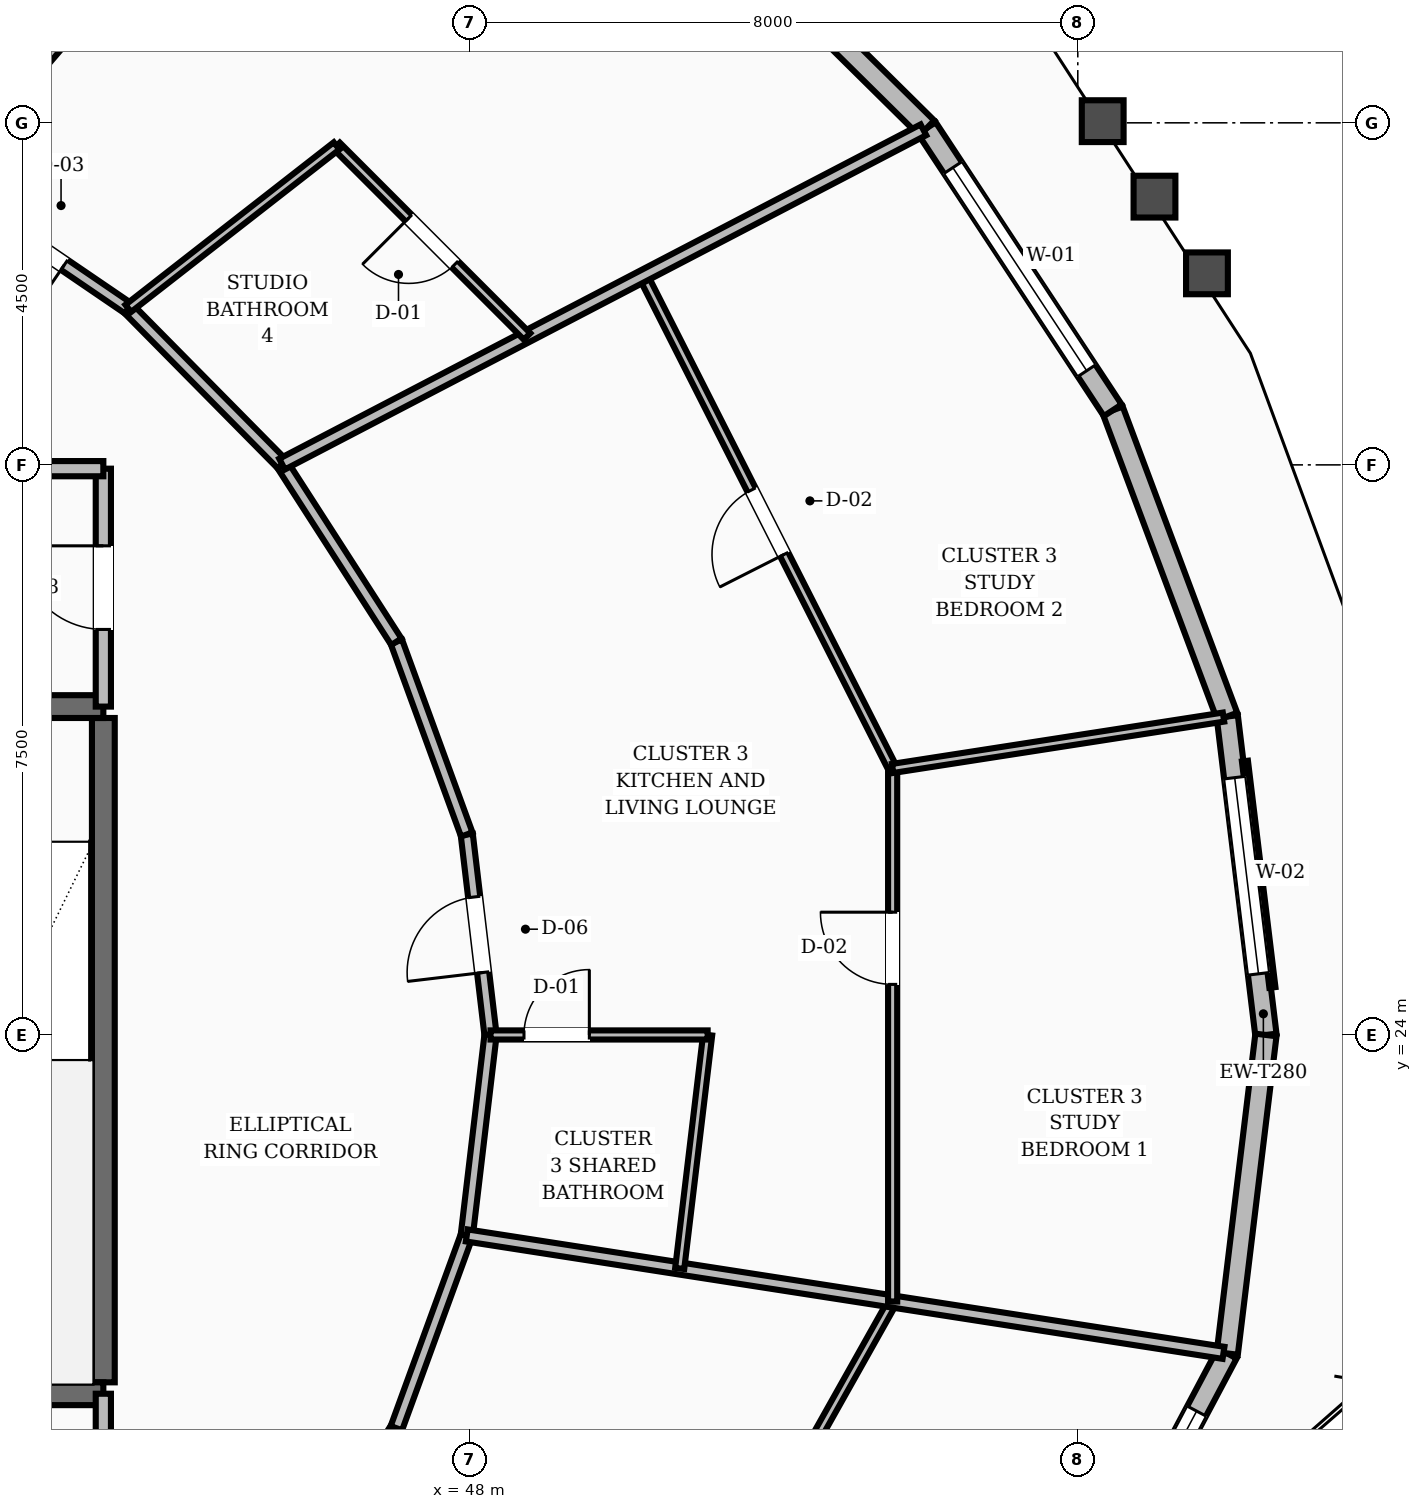
"""IFC4 building model, lengths in metres.
Left out: names, types, materials, properties, quantities, classifications, styles, units other than length and angle.
Written with IfcOpenShell. Run it as: python <this file> out.ifc"""

import sys

from ifc_helpers import new_model, si_unit, direction, frame, frame_2d, origin, place, context, subcontext, project, spatial, rectangle, extrude, element, fill, save


model = new_model("IFC4")
c1 = context("Model", 3, precision=1e-05, world=origin(), true_north=direction((0.0, 1.0)))
c2 = subcontext(c1, "Body", "Model", "MODEL_VIEW")
j1 = project(units=[si_unit("LENGTHUNIT", "METRE"), si_unit("PLANEANGLEUNIT", "RADIAN")], contexts=[c1])
p1 = place(None, origin())
s1 = spatial("IfcSite", under=j1, at=p1, CompositionType="ELEMENT")
p2 = place(p1, origin())
s2 = spatial("IfcBuilding", under=s1, at=p2, CompositionType="ELEMENT")
p3 = place(p2, frame((0.0, 0.0, 52.0)))
s3 = spatial("IfcBuildingStorey", under=s2, at=p3, CompositionType="ELEMENT", Elevation=52.0)
p4 = place(p3, frame((43.18, 19.43, 0.0), z_axis=(0.0, 0.0, 1.0), x_axis=(0.0, 1.0, 0.0)))
e1 = element("IfcWall", 1, at=p4, inside=s3, PredefinedType="SHEAR", context=c2, shape_type="SweptSolid", body=[
    extrude(rectangle(XDim=8.74, YDim=0.3, at=frame_2d((4.37, 0.0))), origin(), (0.0, 0.0, 1.0), 3.6),
])
p5 = place(p3, frame((39.58, 19.28, 0.0), z_axis=(0.0, 0.0, 1.0), x_axis=(1.0, 0.0, 0.0)))
e2 = element("IfcWall", 2, at=p5, inside=s3, PredefinedType="SHEAR", context=c2, shape_type="SweptSolid", body=[
    extrude(rectangle(XDim=3.6, YDim=0.3, at=frame_2d((1.8, 0.0))), origin(), (0.0, 0.0, 1.0), 3.6),
])
p6 = place(p3, frame((39.58, 28.32, 0.0), z_axis=(0.0, 0.0, 1.0), x_axis=(1.0, 0.0, 0.0)))
e3 = element("IfcWall", 3, at=p6, inside=s3, PredefinedType="SHEAR", context=c2, shape_type="SweptSolid", body=[
    extrude(rectangle(XDim=3.6, YDim=0.3, at=frame_2d((1.8, 0.0))), origin(), (0.0, 0.0, 1.0), 3.6),
])
p7 = place(p6, frame((1.3, 0.0, 0.0)))
e4 = element("IfcOpeningElement", 4, at=p7, cuts=e3, PredefinedType="OPENING", context=c2, shape_type="SweptSolid", body=[
    extrude(rectangle(XDim=1.1, YDim=2.1, at=frame_2d((0.55, 1.05))), frame((0.0, 0.16, 0.0), z_axis=(0.0, -1.0, 0.0), x_axis=(1.0, 0.0, 0.0)), (0.0, 0.0, 1.0), 0.32),
])
p8 = place(p3, frame((58.475, 24.0, 0.0), z_axis=(0.0, 0.0, 1.0), x_axis=(-0.120495484084, 0.992713875352, 0.0)))
e5 = element("IfcWall", 5, at=p8, inside=s3, PredefinedType="STANDARD", context=c2, shape_type="SweptSolid", body=[
    extrude(rectangle(XDim=4.22, YDim=0.28, at=frame_2d((2.11, 0.0))), origin(), (0.0, 0.0, 1.0), 2.65),
])
p9 = place(p8, frame((0.81, 0.0, 0.8)))
e6 = element("IfcOpeningElement", 6, at=p9, cuts=e5, PredefinedType="OPENING", context=c2, shape_type="SweptSolid", body=[
    extrude(rectangle(XDim=2.6, YDim=1.65, at=frame_2d((1.3, 0.825))), frame((0.0, 0.15, 0.0), z_axis=(0.0, -1.0, 0.0), x_axis=(1.0, 0.0, 0.0)), (0.0, 0.0, 1.0), 0.3),
])
p10 = place(p3, frame((57.967, 28.19, 0.0), z_axis=(0.0, 0.0, 1.0), x_axis=(-0.350283521278, 0.936643718135, 0.0)))
e7 = element("IfcWall", 7, at=p10, inside=s3, PredefinedType="STANDARD", context=c2, shape_type="SweptSolid", body=[
    extrude(rectangle(XDim=4.301, YDim=0.28, at=frame_2d((2.15, 0.0))), origin(), (0.0, 0.0, 1.0), 2.65),
])
p11 = place(p3, frame((56.46, 32.218, 0.0), z_axis=(0.0, 0.0, 1.0), x_axis=(-0.550282912527, 0.834978272879, 0.0)))
e8 = element("IfcWall", 8, at=p11, inside=s3, PredefinedType="STANDARD", context=c2, shape_type="SweptSolid", body=[
    extrude(rectangle(XDim=4.446, YDim=0.28, at=frame_2d((2.223, 0.0))), origin(), (0.0, 0.0, 1.0), 2.65),
])
p12 = place(p11, frame((0.623, 0.0, 0.8)))
e9 = element("IfcOpeningElement", 9, at=p12, cuts=e8, PredefinedType="OPENING", context=c2, shape_type="SweptSolid", body=[
    extrude(rectangle(XDim=3.2, YDim=1.65, at=frame_2d((1.6, 0.825))), frame((0.0, 0.15, 0.0), z_axis=(0.0, -1.0, 0.0), x_axis=(1.0, 0.0, 0.0)), (0.0, 0.0, 1.0), 0.3),
])
p13 = place(p3, frame((54.013, 35.931, 0.0), z_axis=(0.0, 0.0, 1.0), x_axis=(-0.711208285642, 0.702981347146, 0.0)))
e10 = element("IfcWall", 10, at=p13, inside=s3, PredefinedType="STANDARD", context=c2, shape_type="SweptSolid", body=[
    extrude(rectangle(XDim=4.629, YDim=0.28, at=frame_2d((2.315, 0.0))), origin(), (0.0, 0.0, 1.0), 2.65),
])
p14 = place(p3, frame((55.899, 15.915, 0.0), z_axis=(0.0, 0.0, 1.0), x_axis=(0.46873960988, 0.883336390131, 0.0)))
e11 = element("IfcWall", 11, at=p14, inside=s3, PredefinedType="STANDARD", context=c2, shape_type="SweptSolid", body=[
    extrude(rectangle(XDim=4.41, YDim=0.28, at=frame_2d((2.205, 0.0))), origin(), (0.0, 0.0, 1.0), 2.65),
])
p15 = place(p14, frame((0.951, 0.0, 0.8)))
e12 = element("IfcOpeningElement", 12, at=p15, cuts=e11, PredefinedType="OPENING", context=c2, shape_type="SweptSolid", body=[
    extrude(rectangle(XDim=2.6, YDim=1.65, at=frame_2d((1.3, 0.825))), frame((0.0, 0.15, 0.0), z_axis=(0.0, -1.0, 0.0), x_axis=(1.0, 0.0, 0.0)), (0.0, 0.0, 1.0), 0.3),
])
p16 = place(p3, frame((57.967, 19.81, 0.0), z_axis=(0.0, 0.0, 1.0), x_axis=(0.120495484084, 0.992713875352, 0.0)))
e13 = element("IfcWall", 13, at=p16, inside=s3, PredefinedType="STANDARD", context=c2, shape_type="SweptSolid", body=[
    extrude(rectangle(XDim=4.22, YDim=0.28, at=frame_2d((2.11, 0.0))), origin(), (0.0, 0.0, 1.0), 2.65),
])
p17 = place(p3, frame((43.18, 28.32, 0.0), z_axis=(0.0, 0.0, 1.0), x_axis=(0.0, 1.0, 0.0)))
e14 = element("IfcWall", 14, at=p17, inside=s3, PredefinedType="SOLIDWALL", context=c2, shape_type="SweptSolid", body=[
    extrude(rectangle(XDim=3.13, YDim=0.2, at=frame_2d((1.565, 0.0))), origin(), (0.0, 0.0, 1.0), 2.61),
])
p18 = place(p17, frame((1.015, 0.0, 0.0)))
e15 = element("IfcOpeningElement", 15, at=p18, cuts=e14, PredefinedType="OPENING", context=c2, shape_type="SweptSolid", body=[
    extrude(rectangle(XDim=1.1, YDim=2.1, at=frame_2d((0.55, 1.05))), frame((0.0, 0.11, 0.0), z_axis=(0.0, -1.0, 0.0), x_axis=(1.0, 0.0, 0.0)), (0.0, 0.0, 1.0), 0.22),
])
p19 = place(p3, frame((39.2, 31.45, 0.0), z_axis=(0.0, 0.0, 1.0), x_axis=(1.0, 0.0, 0.0)))
e16 = element("IfcWall", 16, at=p19, inside=s3, PredefinedType="SOLIDWALL", context=c2, shape_type="SweptSolid", body=[
    extrude(rectangle(XDim=3.98, YDim=0.2, at=frame_2d((1.99, 0.0))), origin(), (0.0, 0.0, 1.0), 2.61),
])
p20 = place(p3, frame((43.18, 16.55, 0.0), z_axis=(0.0, 0.0, 1.0), x_axis=(0.0, 1.0, 0.0)))
e17 = element("IfcWall", 17, at=p20, inside=s3, PredefinedType="SOLIDWALL", context=c2, shape_type="SweptSolid", body=[
    extrude(rectangle(XDim=2.73, YDim=0.2, at=frame_2d((1.365, 0.0))), origin(), (0.0, 0.0, 1.0), 2.61),
])
p21 = place(p20, frame((0.89, 0.0, 0.0)))
e18 = element("IfcOpeningElement", 18, at=p21, cuts=e17, PredefinedType="OPENING", context=c2, shape_type="SweptSolid", body=[
    extrude(rectangle(XDim=0.95, YDim=2.1, at=frame_2d((0.475, 1.05))), frame((0.0, 0.11, 0.0), z_axis=(0.0, -1.0, 0.0), x_axis=(1.0, 0.0, 0.0)), (0.0, 0.0, 1.0), 0.22),
])
p22 = place(p3, frame((48.274, 24.0, 0.0), z_axis=(0.0, 0.0, 1.0), x_axis=(-0.117763961213, 0.99304161516, 0.0)))
e19 = element("IfcWall", 19, at=p22, inside=s3, PredefinedType="SOLIDWALL", context=c2, shape_type="SweptSolid", body=[
    extrude(rectangle(XDim=2.656, YDim=0.16, at=frame_2d((1.328, 0.0))), origin(), (0.0, 0.0, 1.0), 2.61),
])
p23 = place(p22, frame((0.828, 0.0, 0.0)))
e20 = element("IfcOpeningElement", 20, at=p23, cuts=e19, PredefinedType="OPENING", context=c2, shape_type="SweptSolid", body=[
    extrude(rectangle(XDim=1.0, YDim=2.1, at=frame_2d((0.5, 1.05))), frame((0.0, 0.09, 0.0), z_axis=(0.0, -1.0, 0.0), x_axis=(1.0, 0.0, 0.0)), (0.0, 0.0, 1.0), 0.18),
])
p24 = place(p3, frame((47.961, 26.637, 0.0), z_axis=(0.0, 0.0, 1.0), x_axis=(-0.343013437329, 0.939330496583, 0.0)))
e21 = element("IfcWall", 21, at=p24, inside=s3, PredefinedType="SOLIDWALL", context=c2, shape_type="SweptSolid", body=[
    extrude(rectangle(XDim=2.7, YDim=0.16, at=frame_2d((1.35, 0.0))), origin(), (0.0, 0.0, 1.0), 2.61),
])
p25 = place(p3, frame((47.035, 29.173, 0.0), z_axis=(0.0, 0.0, 1.0), x_axis=(-0.541126045017, 0.840941498206, 0.0)))
e22 = element("IfcWall", 22, at=p25, inside=s3, PredefinedType="SOLIDWALL", context=c2, shape_type="SweptSolid", body=[
    extrude(rectangle(XDim=2.779, YDim=0.16, at=frame_2d((1.39, 0.0))), origin(), (0.0, 0.0, 1.0), 2.61),
])
p26 = place(p3, frame((45.531, 31.51, 0.0), z_axis=(0.0, 0.0, 1.0), x_axis=(-0.702811997, 0.711375636969, 0.0)))
e23 = element("IfcWall", 23, at=p26, inside=s3, PredefinedType="SOLIDWALL", context=c2, shape_type="SweptSolid", body=[
    extrude(rectangle(XDim=2.879, YDim=0.16, at=frame_2d((1.44, 0.0))), origin(), (0.0, 0.0, 1.0), 2.61),
])
p27 = place(p3, frame((43.508, 33.559, 0.0), z_axis=(0.0, 0.0, 1.0), x_axis=(-0.826293096206, 0.56324037423, 0.0)))
e24 = element("IfcWall", 24, at=p27, inside=s3, PredefinedType="SOLIDWALL", context=c2, shape_type="SweptSolid", body=[
    extrude(rectangle(XDim=2.985, YDim=0.16, at=frame_2d((1.492, 0.0))), origin(), (0.0, 0.0, 1.0), 2.61),
])
p28 = place(p27, frame((1.017, 0.0, 0.0)))
e25 = element("IfcOpeningElement", 25, at=p28, cuts=e24, PredefinedType="OPENING", context=c2, shape_type="SweptSolid", body=[
    extrude(rectangle(XDim=0.95, YDim=2.1, at=frame_2d((0.475, 1.05))), frame((0.0, 0.09, 0.0), z_axis=(0.0, -1.0, 0.0), x_axis=(1.0, 0.0, 0.0)), (0.0, 0.0, 1.0), 0.18),
])
p29 = place(p3, frame((45.531, 16.49, 0.0), z_axis=(0.0, 0.0, 1.0), x_axis=(0.541126045017, 0.840941498206, 0.0)))
e26 = element("IfcWall", 26, at=p29, inside=s3, PredefinedType="SOLIDWALL", context=c2, shape_type="SweptSolid", body=[
    extrude(rectangle(XDim=2.779, YDim=0.16, at=frame_2d((1.39, 0.0))), origin(), (0.0, 0.0, 1.0), 2.61),
])
p30 = place(p3, frame((47.035, 18.827, 0.0), z_axis=(0.0, 0.0, 1.0), x_axis=(0.343013437329, 0.939330496583, 0.0)))
e27 = element("IfcWall", 27, at=p30, inside=s3, PredefinedType="SOLIDWALL", context=c2, shape_type="SweptSolid", body=[
    extrude(rectangle(XDim=2.7, YDim=0.16, at=frame_2d((1.35, 0.0))), origin(), (0.0, 0.0, 1.0), 2.61),
])
p31 = place(p3, frame((47.961, 21.363, 0.0), z_axis=(0.0, 0.0, 1.0), x_axis=(0.117763961213, 0.99304161516, 0.0)))
e28 = element("IfcWall", 28, at=p31, inside=s3, PredefinedType="SOLIDWALL", context=c2, shape_type="SweptSolid", body=[
    extrude(rectangle(XDim=2.656, YDim=0.16, at=frame_2d((1.328, 0.0))), origin(), (0.0, 0.0, 1.0), 2.61),
])
p32 = place(p3, frame((50.021, 14.188, 0.0), z_axis=(0.0, 0.0, 1.0), x_axis=(0.489964721586, 0.87174226214, 0.0)))
e29 = element("IfcWall", 29, at=p32, inside=s3, PredefinedType="PARTITIONING", context=c2, shape_type="SweptSolid", body=[
    extrude(rectangle(XDim=7.233, YDim=0.12, at=frame_2d((3.616, 0.0))), origin(), (0.0, 0.0, 1.0), 2.61),
])
p33 = place(p32, frame((3.141, 0.0, 0.0)))
e30 = element("IfcOpeningElement", 30, at=p33, cuts=e29, PredefinedType="OPENING", context=c2, shape_type="SweptSolid", body=[
    extrude(rectangle(XDim=0.95, YDim=2.1, at=frame_2d((0.475, 1.05))), frame((0.0, 0.07, 0.0), z_axis=(0.0, -1.0, 0.0), x_axis=(1.0, 0.0, 0.0)), (0.0, 0.0, 1.0), 0.14),
])
p34 = place(p3, frame((47.961, 21.363, 0.0), z_axis=(0.0, 0.0, 1.0), x_axis=(0.988176752001, -0.153318970792, 0.0)))
e31 = element("IfcWall", 31, at=p34, inside=s3, PredefinedType="SOLIDWALL", context=c2, shape_type="SweptSolid", body=[
    extrude(rectangle(XDim=10.075, YDim=0.16, at=frame_2d((5.038, 0.0))), origin(), (0.0, 0.0, 1.0), 2.61),
])
p35 = place(p3, frame((50.763, 20.928, 0.0), z_axis=(0.0, 0.0, 1.0), x_axis=(0.118837170514, 0.992913756025, 0.0)))
e32 = element("IfcWall", 32, at=p35, inside=s3, PredefinedType="PARTITIONING", context=c2, shape_type="SweptSolid", body=[
    extrude(rectangle(XDim=3.094, YDim=0.12, at=frame_2d((1.547, 0.0))), origin(), (0.0, 0.0, 1.0), 2.61),
])
p36 = place(p3, frame((48.274, 24.0, 0.0), z_axis=(0.0, 0.0, 1.0), x_axis=(1.0, 0.0, 0.0)))
e33 = element("IfcWall", 33, at=p36, inside=s3, PredefinedType="PARTITIONING", context=c2, shape_type="SweptSolid", body=[
    extrude(rectangle(XDim=2.856, YDim=0.12, at=frame_2d((1.428, 0.0))), origin(), (0.0, 0.0, 1.0), 2.61),
])
p37 = place(p36, frame((0.44, 0.0, 0.0)))
e34 = element("IfcOpeningElement", 34, at=p37, cuts=e33, PredefinedType="OPENING", context=c2, shape_type="SweptSolid", body=[
    extrude(rectangle(XDim=0.86, YDim=2.1, at=frame_2d((0.43, 1.05))), frame((0.0, 0.07, 0.0), z_axis=(0.0, -1.0, 0.0), x_axis=(1.0, 0.0, 0.0)), (0.0, 0.0, 1.0), 0.14),
])
p38 = place(p3, frame((53.564, 20.493, 0.0), z_axis=(0.0, 0.0, 1.0), x_axis=(0.0, 1.0, 0.0)))
e35 = element("IfcWall", 35, at=p38, inside=s3, PredefinedType="PARTITIONING", context=c2, shape_type="SweptSolid", body=[
    extrude(rectangle(XDim=7.013, YDim=0.12, at=frame_2d((3.507, 0.0))), origin(), (0.0, 0.0, 1.0), 2.61),
])
p39 = place(p38, frame((4.172, 0.0, 0.0)))
e36 = element("IfcOpeningElement", 36, at=p39, cuts=e35, PredefinedType="OPENING", context=c2, shape_type="SweptSolid", body=[
    extrude(rectangle(XDim=0.95, YDim=2.1, at=frame_2d((0.475, 1.05))), frame((0.0, 0.07, 0.0), z_axis=(0.0, -1.0, 0.0), x_axis=(1.0, 0.0, 0.0)), (0.0, 0.0, 1.0), 0.14),
])
p40 = place(p3, frame((53.564, 27.507, 0.0), z_axis=(0.0, 0.0, 1.0), x_axis=(-0.451980127483, 0.892028006489, 0.0)))
e37 = element("IfcWall", 37, at=p40, inside=s3, PredefinedType="PARTITIONING", context=c2, shape_type="SweptSolid", body=[
    extrude(rectangle(XDim=7.263, YDim=0.12, at=frame_2d((3.632, 0.0))), origin(), (0.0, 0.0, 1.0), 2.61),
])
p41 = place(p40, frame((3.157, 0.0, 0.0)))
e38 = element("IfcOpeningElement", 38, at=p41, cuts=e37, PredefinedType="OPENING", context=c2, shape_type="SweptSolid", body=[
    extrude(rectangle(XDim=0.95, YDim=2.1, at=frame_2d((0.475, 1.05))), frame((0.0, 0.07, 0.0), z_axis=(0.0, -1.0, 0.0), x_axis=(1.0, 0.0, 0.0)), (0.0, 0.0, 1.0), 0.14),
])
p42 = place(p3, frame((53.564, 27.507, 0.0), z_axis=(0.0, 0.0, 1.0), x_axis=(0.988178681205, 0.153306536105, 0.0)))
e39 = element("IfcWall", 39, at=p42, inside=s3, PredefinedType="PARTITIONING", context=c2, shape_type="SweptSolid", body=[
    extrude(rectangle(XDim=4.405, YDim=0.12, at=frame_2d((2.202, 0.0))), origin(), (0.0, 0.0, 1.0), 2.61),
])
p43 = place(p3, frame((45.531, 31.51, 0.0), z_axis=(0.0, 0.0, 1.0), x_axis=(0.886782865133, 0.462186272088, 0.0)))
e40 = element("IfcWall", 40, at=p43, inside=s3, PredefinedType="SOLIDWALL", context=c2, shape_type="SweptSolid", body=[
    extrude(rectangle(XDim=9.515, YDim=0.16, at=frame_2d((4.757, 0.0))), origin(), (0.0, 0.0, 1.0), 2.61),
])
p44 = place(p3, frame((48.754, 33.19, 0.0), z_axis=(0.0, 0.0, 1.0), x_axis=(-0.707003450842, 0.707210096434, 0.0)))
e41 = element("IfcWall", 41, at=p44, inside=s3, PredefinedType="PARTITIONING", context=c2, shape_type="SweptSolid", body=[
    extrude(rectangle(XDim=3.544, YDim=0.12, at=frame_2d((1.772, 0.0))), origin(), (0.0, 0.0, 1.0), 2.61),
])
p45 = place(p44, frame((1.342, 0.0, 0.0)))
e42 = element("IfcOpeningElement", 42, at=p45, cuts=e41, PredefinedType="OPENING", context=c2, shape_type="SweptSolid", body=[
    extrude(rectangle(XDim=0.86, YDim=2.1, at=frame_2d((0.43, 1.05))), frame((0.0, 0.07, 0.0), z_axis=(0.0, -1.0, 0.0), x_axis=(1.0, 0.0, 0.0)), (0.0, 0.0, 1.0), 0.14),
])
p46 = place(p3, frame((43.508, 33.559, 0.0), z_axis=(0.0, 0.0, 1.0), x_axis=(0.788470290208, 0.615072842401, 0.0)))
e43 = element("IfcWall", 43, at=p46, inside=s3, PredefinedType="PARTITIONING", context=c2, shape_type="SweptSolid", body=[
    extrude(rectangle(XDim=3.476, YDim=0.12, at=frame_2d((1.738, 0.0))), origin(), (0.0, 0.0, 1.0), 2.61),
])
p47 = place(p3, frame((41.041, 35.24, 0.0), z_axis=(0.0, 0.0, 1.0), x_axis=(0.650552260828, 0.75946149075, 0.0)))
e44 = element("IfcWall", 44, at=p47, inside=s3, PredefinedType="SOLIDWALL", context=c2, shape_type="SweptSolid", body=[
    extrude(rectangle(XDim=8.662, YDim=0.16, at=frame_2d((4.331, 0.0))), origin(), (0.0, 0.0, 1.0), 2.61),
])
p48 = place(p9, origin())
e45 = element("IfcWindow", 45, at=p48, inside=s3, PartitioningType="SINGLE_PANEL", PredefinedType="WINDOW", context=c2, shape_type="SweptSolid", body=[
    extrude(rectangle(XDim=2.6, YDim=1.65, at=frame_2d((1.3, 0.825))), frame((0.0, 0.03, 0.0), z_axis=(0.0, -1.0, 0.0), x_axis=(1.0, 0.0, 0.0)), (0.0, 0.0, 1.0), 0.06),
])
fill(e6, e45)
p49 = place(p12, origin())
e46 = element("IfcWindow", 46, at=p49, inside=s3, PartitioningType="SINGLE_PANEL", PredefinedType="WINDOW", context=c2, shape_type="SweptSolid", body=[
    extrude(rectangle(XDim=3.2, YDim=1.65, at=frame_2d((1.6, 0.825))), frame((0.0, 0.03, 0.0), z_axis=(0.0, -1.0, 0.0), x_axis=(1.0, 0.0, 0.0)), (0.0, 0.0, 1.0), 0.06),
])
fill(e9, e46)
p50 = place(p15, origin())
e47 = element("IfcWindow", 47, at=p50, inside=s3, PartitioningType="SINGLE_PANEL", PredefinedType="WINDOW", context=c2, shape_type="SweptSolid", body=[
    extrude(rectangle(XDim=2.6, YDim=1.65, at=frame_2d((1.3, 0.825))), frame((0.0, 0.03, 0.0), z_axis=(0.0, -1.0, 0.0), x_axis=(1.0, 0.0, 0.0)), (0.0, 0.0, 1.0), 0.06),
])
fill(e12, e47)
p51 = place(p18, origin())
e48 = element("IfcDoor", 48, at=p51, inside=s3, OperationType="SINGLE_SWING_RIGHT", PredefinedType="DOOR", context=c2, shape_type="SweptSolid", body=[
    extrude(rectangle(XDim=1.1, YDim=2.1, at=frame_2d((0.55, 1.05))), frame((0.0, 0.025, 0.0), z_axis=(0.0, -1.0, 0.0), x_axis=(1.0, 0.0, 0.0)), (0.0, 0.0, 1.0), 0.05),
])
fill(e15, e48)
p52 = place(p37, origin())
e49 = element("IfcDoor", 49, at=p52, inside=s3, OperationType="SINGLE_SWING_RIGHT", PredefinedType="DOOR", context=c2, shape_type="SweptSolid", body=[
    extrude(rectangle(XDim=0.86, YDim=2.1, at=frame_2d((0.43, 1.05))), frame((0.0, 0.025, 0.0), z_axis=(0.0, -1.0, 0.0), x_axis=(1.0, 0.0, 0.0)), (0.0, 0.0, 1.0), 0.05),
])
fill(e34, e49)
p53 = place(p23, origin())
e50 = element("IfcDoor", 50, at=p53, inside=s3, OperationType="SINGLE_SWING_LEFT", PredefinedType="DOOR", context=c2, shape_type="SweptSolid", body=[
    extrude(rectangle(XDim=1.0, YDim=2.1, at=frame_2d((0.5, 1.05))), frame((0.0, 0.025, 0.0), z_axis=(0.0, -1.0, 0.0), x_axis=(1.0, 0.0, 0.0)), (0.0, 0.0, 1.0), 0.05),
])
fill(e20, e50)
p54 = place(p39, origin())
e51 = element("IfcDoor", 51, at=p54, inside=s3, OperationType="SINGLE_SWING_RIGHT", PredefinedType="DOOR", context=c2, shape_type="SweptSolid", body=[
    extrude(rectangle(XDim=0.95, YDim=2.1, at=frame_2d((0.475, 1.05))), frame((0.0, 0.025, 0.0), z_axis=(0.0, -1.0, 0.0), x_axis=(1.0, 0.0, 0.0)), (0.0, 0.0, 1.0), 0.05),
])
fill(e36, e51)
p55 = place(p41, origin())
e52 = element("IfcDoor", 52, at=p55, inside=s3, OperationType="SINGLE_SWING_LEFT", PredefinedType="DOOR", context=c2, shape_type="SweptSolid", body=[
    extrude(rectangle(XDim=0.95, YDim=2.1, at=frame_2d((0.475, 1.05))), frame((0.0, 0.025, 0.0), z_axis=(0.0, -1.0, 0.0), x_axis=(1.0, 0.0, 0.0)), (0.0, 0.0, 1.0), 0.05),
])
fill(e38, e52)
p56 = place(p45, origin())
e53 = element("IfcDoor", 53, at=p56, inside=s3, OperationType="SINGLE_SWING_RIGHT", PredefinedType="DOOR", context=c2, shape_type="SweptSolid", body=[
    extrude(rectangle(XDim=0.86, YDim=2.1, at=frame_2d((0.43, 1.05))), frame((0.0, 0.025, 0.0), z_axis=(0.0, -1.0, 0.0), x_axis=(1.0, 0.0, 0.0)), (0.0, 0.0, 1.0), 0.05),
])
fill(e42, e53)
p57 = place(p28, origin())
e54 = element("IfcDoor", 54, at=p57, inside=s3, OperationType="SINGLE_SWING_LEFT", PredefinedType="DOOR", context=c2, shape_type="SweptSolid", body=[
    extrude(rectangle(XDim=0.95, YDim=2.1, at=frame_2d((0.475, 1.05))), frame((0.0, 0.025, 0.0), z_axis=(0.0, -1.0, 0.0), x_axis=(1.0, 0.0, 0.0)), (0.0, 0.0, 1.0), 0.05),
])
fill(e25, e54)
save(model, sys.argv[1])
